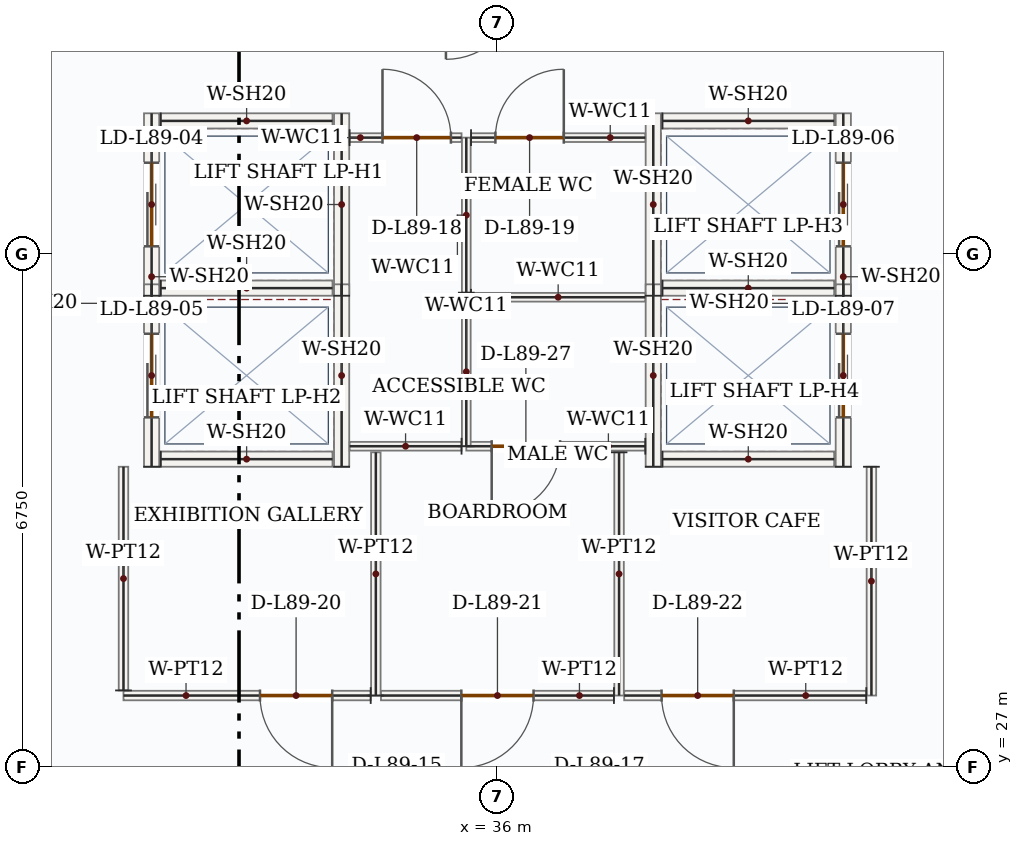
"""IFC4 building model, lengths in metres.
Left out: names, types, materials, properties, quantities, classifications, styles, units other than length and angle.
Written with IfcOpenShell. Run it as: python <this file> out.ifc"""

import sys

from ifc_helpers import new_model, si_unit, direction, frame, frame_2d, origin, place, context, subcontext, project, spatial, rectangle, extrude, source, transform, mapped, element, fill, save


model = new_model("IFC4")
c1 = context("Model", 3, precision=1e-05, world=origin(), true_north=direction((0.0, 1.0)))
c2 = subcontext(c1, "Body", "Model", "MODEL_VIEW")
j1 = project(units=[si_unit("LENGTHUNIT", "METRE"), si_unit("PLANEANGLEUNIT", "RADIAN")], contexts=[c1])
p1 = place(None, origin())
s1 = spatial("IfcSite", under=j1, at=p1, CompositionType="ELEMENT")
p2 = place(p1, origin())
s2 = spatial("IfcBuilding", under=s1, at=p2, CompositionType="ELEMENT")
p3 = place(p2, frame((0.0, 0.0, 365.85)))
s3 = spatial("IfcBuildingStorey", under=s2, at=p3, CompositionType="ELEMENT", Elevation=365.85)
p4 = place(p3, frame((31.45, 33.2, 0.0), z_axis=(0.0, 0.0, 1.0), x_axis=(0.0, 1.0, 0.0)))
e1 = element("IfcWall", 1, at=p4, inside=s3, PredefinedType="SOLIDWALL", context=c2, shape_type="SweptSolid", body=[
    extrude(rectangle(XDim=2.4, YDim=0.2, at=frame_2d((1.2, 0.0))), origin(), (0.0, 0.0, 1.0), 4.55),
])
p5 = place(p4, frame((0.65, 0.0, 0.0)))
e2 = element("IfcOpeningElement", 2, at=p5, cuts=e1, PredefinedType="OPENING", context=c2, shape_type="SweptSolid", body=[
    extrude(rectangle(XDim=1.1, YDim=2.15, at=frame_2d((0.55, 1.075))), frame((0.0, 0.11, 0.0), z_axis=(0.0, -1.0, 0.0), x_axis=(1.0, 0.0, 0.0)), (0.0, 0.0, 1.0), 0.22),
])
m1 = source(origin(), c2, "Body", "SweptSolid", [
    extrude(rectangle(XDim=2.4, YDim=0.2, at=frame_2d((1.2, 0.0))), origin(), (0.0, 0.0, 1.0), 4.55),
])
p6 = place(p3, frame((33.95, 33.2, 0.0), z_axis=(0.0, 0.0, 1.0), x_axis=(0.0, 1.0, 0.0)))
e3 = element("IfcWall", 3, at=p6, inside=s3, PredefinedType="SOLIDWALL", context=c2, shape_type="MappedRepresentation", body=[
    mapped(m1, transform((0.0, 0.0, 0.0), x_axis=(1.0, 0.0, 0.0), y_axis=(0.0, 1.0, 0.0), z_axis=(0.0, 0.0, 1.0), scale=1.0)),
])
m2 = source(origin(), c2, "Body", "SweptSolid", [
    extrude(rectangle(XDim=2.26, YDim=0.2, at=frame_2d((1.13, 0.0))), origin(), (0.0, 0.0, 1.0), 4.55),
])
for number, where, z_axis, x_axis in (
    (4, (31.57, 33.3, 0.0), (0.0, 0.0, 1.0), (1.0, 0.0, 0.0)),
    (5, (31.57, 35.5, 0.0), (0.0, 0.0, 1.0), (1.0, 0.0, 0.0)),
):
    element("IfcWall", number, at=place(p3, frame(where, z_axis=z_axis, x_axis=x_axis)), inside=s3, PredefinedType="SOLIDWALL", context=c2, shape_type="MappedRepresentation", body=[
        mapped(m2, transform((0.0, 0.0, 0.0), x_axis=(1.0, 0.0, 0.0), y_axis=(0.0, 1.0, 0.0), z_axis=(0.0, 0.0, 1.0), scale=1.0)),
    ])
p7 = place(p3, frame((31.45, 30.95, 0.0), z_axis=(0.0, 0.0, 1.0), x_axis=(0.0, 1.0, 0.0)))
e6 = element("IfcWall", 6, at=p7, inside=s3, PredefinedType="SOLIDWALL", context=c2, shape_type="SweptSolid", body=[
    extrude(rectangle(XDim=2.4, YDim=0.2, at=frame_2d((1.2, 0.0))), origin(), (0.0, 0.0, 1.0), 4.55),
])
p8 = place(p7, frame((0.65, 0.0, 0.0)))
e7 = element("IfcOpeningElement", 7, at=p8, cuts=e6, PredefinedType="OPENING", context=c2, shape_type="SweptSolid", body=[
    extrude(rectangle(XDim=1.1, YDim=2.15, at=frame_2d((0.55, 1.075))), frame((0.0, 0.11, 0.0), z_axis=(0.0, -1.0, 0.0), x_axis=(1.0, 0.0, 0.0)), (0.0, 0.0, 1.0), 0.22),
])
p9 = place(p3, frame((33.95, 30.95, 0.0), z_axis=(0.0, 0.0, 1.0), x_axis=(0.0, 1.0, 0.0)))
e8 = element("IfcWall", 8, at=p9, inside=s3, PredefinedType="SOLIDWALL", context=c2, shape_type="MappedRepresentation", body=[
    mapped(m1, transform((0.0, 0.0, 0.0), x_axis=(1.0, 0.0, 0.0), y_axis=(0.0, 1.0, 0.0), z_axis=(0.0, 0.0, 1.0), scale=1.0)),
])
p10 = place(p3, frame((31.57, 31.05, 0.0), z_axis=(0.0, 0.0, 1.0), x_axis=(1.0, 0.0, 0.0)))
e9 = element("IfcWall", 9, at=p10, inside=s3, PredefinedType="SOLIDWALL", context=c2, shape_type="MappedRepresentation", body=[
    mapped(m2, transform((0.0, 0.0, 0.0), x_axis=(1.0, 0.0, 0.0), y_axis=(0.0, 1.0, 0.0), z_axis=(0.0, 0.0, 1.0), scale=1.0)),
])
p11 = place(p3, frame((38.05, 33.2, 0.0), z_axis=(0.0, 0.0, 1.0), x_axis=(0.0, 1.0, 0.0)))
e10 = element("IfcWall", 10, at=p11, inside=s3, PredefinedType="SOLIDWALL", context=c2, shape_type="MappedRepresentation", body=[
    mapped(m1, transform((0.0, 0.0, 0.0), x_axis=(1.0, 0.0, 0.0), y_axis=(0.0, 1.0, 0.0), z_axis=(0.0, 0.0, 1.0), scale=1.0)),
])
p12 = place(p3, frame((40.55, 33.2, 0.0), z_axis=(0.0, 0.0, 1.0), x_axis=(0.0, 1.0, 0.0)))
e11 = element("IfcWall", 11, at=p12, inside=s3, PredefinedType="SOLIDWALL", context=c2, shape_type="SweptSolid", body=[
    extrude(rectangle(XDim=2.4, YDim=0.2, at=frame_2d((1.2, 0.0))), origin(), (0.0, 0.0, 1.0), 4.55),
])
p13 = place(p12, frame((0.65, 0.0, 0.0)))
e12 = element("IfcOpeningElement", 12, at=p13, cuts=e11, PredefinedType="OPENING", context=c2, shape_type="SweptSolid", body=[
    extrude(rectangle(XDim=1.1, YDim=2.15, at=frame_2d((0.55, 1.075))), frame((0.0, 0.11, 0.0), z_axis=(0.0, -1.0, 0.0), x_axis=(1.0, 0.0, 0.0)), (0.0, 0.0, 1.0), 0.22),
])
for number, where, z_axis, x_axis in (
    (13, (38.17, 33.3, 0.0), (0.0, 0.0, 1.0), (1.0, 0.0, 0.0)),
    (14, (38.17, 35.5, 0.0), (0.0, 0.0, 1.0), (1.0, 0.0, 0.0)),
):
    element("IfcWall", number, at=place(p3, frame(where, z_axis=z_axis, x_axis=x_axis)), inside=s3, PredefinedType="SOLIDWALL", context=c2, shape_type="MappedRepresentation", body=[
        mapped(m2, transform((0.0, 0.0, 0.0), x_axis=(1.0, 0.0, 0.0), y_axis=(0.0, 1.0, 0.0), z_axis=(0.0, 0.0, 1.0), scale=1.0)),
    ])
p14 = place(p3, frame((38.05, 30.95, 0.0), z_axis=(0.0, 0.0, 1.0), x_axis=(0.0, 1.0, 0.0)))
e15 = element("IfcWall", 15, at=p14, inside=s3, PredefinedType="SOLIDWALL", context=c2, shape_type="MappedRepresentation", body=[
    mapped(m1, transform((0.0, 0.0, 0.0), x_axis=(1.0, 0.0, 0.0), y_axis=(0.0, 1.0, 0.0), z_axis=(0.0, 0.0, 1.0), scale=1.0)),
])
p15 = place(p3, frame((40.55, 30.95, 0.0), z_axis=(0.0, 0.0, 1.0), x_axis=(0.0, 1.0, 0.0)))
e16 = element("IfcWall", 16, at=p15, inside=s3, PredefinedType="SOLIDWALL", context=c2, shape_type="SweptSolid", body=[
    extrude(rectangle(XDim=2.4, YDim=0.2, at=frame_2d((1.2, 0.0))), origin(), (0.0, 0.0, 1.0), 4.55),
])
p16 = place(p15, frame((0.65, 0.0, 0.0)))
e17 = element("IfcOpeningElement", 17, at=p16, cuts=e16, PredefinedType="OPENING", context=c2, shape_type="SweptSolid", body=[
    extrude(rectangle(XDim=1.1, YDim=2.15, at=frame_2d((0.55, 1.075))), frame((0.0, 0.11, 0.0), z_axis=(0.0, -1.0, 0.0), x_axis=(1.0, 0.0, 0.0)), (0.0, 0.0, 1.0), 0.22),
])
p17 = place(p3, frame((38.17, 31.05, 0.0), z_axis=(0.0, 0.0, 1.0), x_axis=(1.0, 0.0, 0.0)))
e18 = element("IfcWall", 18, at=p17, inside=s3, PredefinedType="SOLIDWALL", context=c2, shape_type="MappedRepresentation", body=[
    mapped(m2, transform((0.0, 0.0, 0.0), x_axis=(1.0, 0.0, 0.0), y_axis=(0.0, 1.0, 0.0), z_axis=(0.0, 0.0, 1.0), scale=1.0)),
])
p18 = place(p3, frame((37.945, 31.22, 0.0), z_axis=(0.0, 0.0, 1.0), x_axis=(-1.0, 0.0, 0.0)))
e19 = element("IfcWall", 19, at=p18, inside=s3, PredefinedType="PARTITIONING", context=c2, shape_type="SweptSolid", body=[
    extrude(rectangle(XDim=2.355, YDim=0.115, at=frame_2d((1.177, 0.0))), origin(), (0.0, 0.0, 1.0), 4.55),
])
p19 = place(p18, frame((1.121, 0.0, 0.0)))
e20 = element("IfcOpeningElement", 20, at=p19, cuts=e19, PredefinedType="OPENING", context=c2, shape_type="SweptSolid", body=[
    extrude(rectangle(XDim=0.9, YDim=2.1, at=frame_2d((0.45, 1.05))), frame((0.0, 0.067, 0.0), z_axis=(0.0, -1.0, 0.0), x_axis=(1.0, 0.0, 0.0)), (0.0, 0.0, 1.0), 0.135),
])
m3 = source(origin(), c2, "Body", "SweptSolid", [
    extrude(rectangle(XDim=1.96, YDim=0.115, at=frame_2d((0.98, 0.0))), origin(), (0.0, 0.0, 1.0), 4.55),
])
p20 = place(p3, frame((35.59, 31.22, 0.0), z_axis=(0.0, 0.0, 1.0), x_axis=(0.0, 1.0, 0.0)))
e21 = element("IfcWall", 21, at=p20, inside=s3, PredefinedType="PARTITIONING", context=c2, shape_type="MappedRepresentation", body=[
    mapped(m3, transform((0.0, 0.0, 0.0), x_axis=(1.0, 0.0, 0.0), y_axis=(0.0, 1.0, 0.0), z_axis=(0.0, 0.0, 1.0), scale=1.0)),
])
m4 = source(origin(), c2, "Body", "SweptSolid", [
    extrude(rectangle(XDim=2.292, YDim=0.115, at=frame_2d((1.146, 0.0))), origin(), (0.0, 0.0, 1.0), 4.55),
])
p21 = place(p3, frame((35.653, 33.18, 0.0), z_axis=(0.0, 0.0, 1.0), x_axis=(1.0, 0.0, 0.0)))
e22 = element("IfcWall", 22, at=p21, inside=s3, PredefinedType="PARTITIONING", context=c2, shape_type="MappedRepresentation", body=[
    mapped(m4, transform((0.0, 0.0, 0.0), x_axis=(1.0, 0.0, 0.0), y_axis=(0.0, 1.0, 0.0), z_axis=(0.0, 0.0, 1.0), scale=1.0)),
])
m5 = source(origin(), c2, "Body", "SweptSolid", [
    extrude(rectangle(XDim=2.04, YDim=0.115, at=frame_2d((1.02, 0.0))), origin(), (0.0, 0.0, 1.0), 4.55),
])
p22 = place(p3, frame((35.59, 33.24, 0.0), z_axis=(0.0, 0.0, 1.0), x_axis=(0.0, 1.0, 0.0)))
e23 = element("IfcWall", 23, at=p22, inside=s3, PredefinedType="PARTITIONING", context=c2, shape_type="MappedRepresentation", body=[
    mapped(m5, transform((0.0, 0.0, 0.0), x_axis=(1.0, 0.0, 0.0), y_axis=(0.0, 1.0, 0.0), z_axis=(0.0, 0.0, 1.0), scale=1.0)),
])
p23 = place(p3, frame((35.653, 35.28, 0.0), z_axis=(0.0, 0.0, 1.0), x_axis=(1.0, 0.0, 0.0)))
e24 = element("IfcWall", 24, at=p23, inside=s3, PredefinedType="PARTITIONING", context=c2, shape_type="SweptSolid", body=[
    extrude(rectangle(XDim=2.292, YDim=0.115, at=frame_2d((1.146, 0.0))), origin(), (0.0, 0.0, 1.0), 4.55),
])
p24 = place(p23, frame((0.32, 0.0, 0.0)))
e25 = element("IfcOpeningElement", 25, at=p24, cuts=e24, PredefinedType="OPENING", context=c2, shape_type="SweptSolid", body=[
    extrude(rectangle(XDim=0.9, YDim=2.1, at=frame_2d((0.45, 1.05))), frame((0.0, 0.067, 0.0), z_axis=(0.0, -1.0, 0.0), x_axis=(1.0, 0.0, 0.0)), (0.0, 0.0, 1.0), 0.135),
])
m6 = source(origin(), c2, "Body", "SweptSolid", [
    extrude(rectangle(XDim=1.473, YDim=0.115, at=frame_2d((0.736, 0.0))), origin(), (0.0, 0.0, 1.0), 4.55),
])
p25 = place(p3, frame((35.528, 31.22, 0.0), z_axis=(0.0, 0.0, 1.0), x_axis=(-1.0, 0.0, 0.0)))
e26 = element("IfcWall", 26, at=p25, inside=s3, PredefinedType="PARTITIONING", context=c2, shape_type="MappedRepresentation", body=[
    mapped(m6, transform((0.0, 0.0, 0.0), x_axis=(1.0, 0.0, 0.0), y_axis=(0.0, 1.0, 0.0), z_axis=(0.0, 0.0, 1.0), scale=1.0)),
])
p26 = place(p3, frame((34.055, 35.28, 0.0), z_axis=(0.0, 0.0, 1.0), x_axis=(1.0, 0.0, 0.0)))
e27 = element("IfcWall", 27, at=p26, inside=s3, PredefinedType="PARTITIONING", context=c2, shape_type="SweptSolid", body=[
    extrude(rectangle(XDim=1.473, YDim=0.115, at=frame_2d((0.736, 0.0))), origin(), (0.0, 0.0, 1.0), 4.55),
])
p27 = place(p26, frame((0.433, 0.0, 0.0)))
e28 = element("IfcOpeningElement", 28, at=p27, cuts=e27, PredefinedType="OPENING", context=c2, shape_type="SweptSolid", body=[
    extrude(rectangle(XDim=0.9, YDim=2.1, at=frame_2d((0.45, 1.05))), frame((0.0, 0.067, 0.0), z_axis=(0.0, -1.0, 0.0), x_axis=(1.0, 0.0, 0.0)), (0.0, 0.0, 1.0), 0.135),
])
m7 = source(origin(), c2, "Body", "SweptSolid", [
    extrude(rectangle(XDim=3.2, YDim=0.125, at=frame_2d((1.6, 0.0))), origin(), (0.0, 0.0, 1.0), 4.55),
])
for number, where, z_axis, x_axis in (
    (29, (34.4, 27.94, 0.0), (0.0, 0.0, 1.0), (0.0, 1.0, 0.0)),
    (30, (37.6, 31.14, 0.0), (0.0, 0.0, 1.0), (0.0, -1.0, 0.0)),
):
    element("IfcWall", number, at=place(p3, frame(where, z_axis=z_axis, x_axis=x_axis)), inside=s3, PredefinedType="PARTITIONING", context=c2, shape_type="MappedRepresentation", body=[
        mapped(m7, transform((0.0, 0.0, 0.0), x_axis=(1.0, 0.0, 0.0), y_axis=(0.0, 1.0, 0.0), z_axis=(0.0, 0.0, 1.0), scale=1.0)),
    ])
p28 = place(p3, frame((37.532, 27.94, 0.0), z_axis=(0.0, 0.0, 1.0), x_axis=(-1.0, 0.0, 0.0)))
e31 = element("IfcWall", 31, at=p28, inside=s3, PredefinedType="PARTITIONING", context=c2, shape_type="SweptSolid", body=[
    extrude(rectangle(XDim=3.065, YDim=0.125, at=frame_2d((1.532, 0.0))), origin(), (0.0, 0.0, 1.0), 4.55),
])
p29 = place(p28, frame((1.058, 0.0, 0.0)))
e32 = element("IfcOpeningElement", 32, at=p29, cuts=e31, PredefinedType="OPENING", context=c2, shape_type="SweptSolid", body=[
    extrude(rectangle(XDim=0.95, YDim=2.15, at=frame_2d((0.475, 1.075))), frame((0.0, 0.073, 0.0), z_axis=(0.0, -1.0, 0.0), x_axis=(1.0, 0.0, 0.0)), (0.0, 0.0, 1.0), 0.145),
])
p30 = place(p3, frame((34.333, 27.94, 0.0), z_axis=(0.0, 0.0, 1.0), x_axis=(-1.0, 0.0, 0.0)))
e33 = element("IfcWall", 33, at=p30, inside=s3, PredefinedType="PARTITIONING", context=c2, shape_type="SweptSolid", body=[
    extrude(rectangle(XDim=3.252, YDim=0.125, at=frame_2d((1.626, 0.0))), origin(), (0.0, 0.0, 1.0), 4.55),
])
p31 = place(p30, frame((0.507, 0.0, 0.0)))
e34 = element("IfcOpeningElement", 34, at=p31, cuts=e33, PredefinedType="OPENING", context=c2, shape_type="SweptSolid", body=[
    extrude(rectangle(XDim=0.95, YDim=2.15, at=frame_2d((0.475, 1.075))), frame((0.0, 0.073, 0.0), z_axis=(0.0, -1.0, 0.0), x_axis=(1.0, 0.0, 0.0)), (0.0, 0.0, 1.0), 0.145),
])
m8 = source(origin(), c2, "Body", "SweptSolid", [
    extrude(rectangle(XDim=2.942, YDim=0.125, at=frame_2d((1.471, 0.0))), origin(), (0.0, 0.0, 1.0), 4.55),
])
p32 = place(p3, frame((31.08, 28.008, 0.0), z_axis=(0.0, 0.0, 1.0), x_axis=(0.0, 1.0, 0.0)))
e35 = element("IfcWall", 35, at=p32, inside=s3, PredefinedType="PARTITIONING", context=c2, shape_type="MappedRepresentation", body=[
    mapped(m8, transform((0.0, 0.0, 0.0), x_axis=(1.0, 0.0, 0.0), y_axis=(0.0, 1.0, 0.0), z_axis=(0.0, 0.0, 1.0), scale=1.0)),
])
m9 = source(origin(), c2, "Body", "SweptSolid", [
    extrude(rectangle(XDim=3.01, YDim=0.125, at=frame_2d((1.505, 0.0))), origin(), (0.0, 0.0, 1.0), 4.55),
])
p33 = place(p3, frame((40.92, 30.95, 0.0), z_axis=(0.0, 0.0, 1.0), x_axis=(0.0, -1.0, 0.0)))
e36 = element("IfcWall", 36, at=p33, inside=s3, PredefinedType="PARTITIONING", context=c2, shape_type="MappedRepresentation", body=[
    mapped(m9, transform((0.0, 0.0, 0.0), x_axis=(1.0, 0.0, 0.0), y_axis=(0.0, 1.0, 0.0), z_axis=(0.0, 0.0, 1.0), scale=1.0)),
])
p34 = place(p3, frame((40.853, 27.94, 0.0), z_axis=(0.0, 0.0, 1.0), x_axis=(-1.0, 0.0, 0.0)))
e37 = element("IfcWall", 37, at=p34, inside=s3, PredefinedType="PARTITIONING", context=c2, shape_type="SweptSolid", body=[
    extrude(rectangle(XDim=3.185, YDim=0.125, at=frame_2d((1.593, 0.0))), origin(), (0.0, 0.0, 1.0), 4.55),
])
p35 = place(p34, frame((1.743, 0.0, 0.0)))
e38 = element("IfcOpeningElement", 38, at=p35, cuts=e37, PredefinedType="OPENING", context=c2, shape_type="SweptSolid", body=[
    extrude(rectangle(XDim=0.95, YDim=2.15, at=frame_2d((0.475, 1.075))), frame((0.0, 0.073, 0.0), z_axis=(0.0, -1.0, 0.0), x_axis=(1.0, 0.0, 0.0)), (0.0, 0.0, 1.0), 0.145),
])
m10 = source(origin(), c2, "Body", "SweptSolid", [
    extrude(rectangle(XDim=1.1, YDim=2.15, at=frame_2d((0.55, 1.075))), frame((0.0, 0.025, 0.0), z_axis=(0.0, -1.0, 0.0), x_axis=(1.0, 0.0, 0.0)), (0.0, 0.0, 1.0), 0.05),
])
p36 = place(p5, origin())
e39 = element("IfcDoor", 39, at=p36, inside=s3, OperationType="DOUBLE_DOOR_SLIDING", PredefinedType="DOOR", context=c2, shape_type="MappedRepresentation", body=[
    mapped(m10, transform((0.0, 0.0, 0.0), x_axis=(1.0, 0.0, 0.0), y_axis=(0.0, 1.0, 0.0), z_axis=(0.0, 0.0, 1.0), scale=1.0)),
])
fill(e2, e39)
p37 = place(p8, origin())
e40 = element("IfcDoor", 40, at=p37, inside=s3, OperationType="DOUBLE_DOOR_SLIDING", PredefinedType="DOOR", context=c2, shape_type="MappedRepresentation", body=[
    mapped(m10, transform((0.0, 0.0, 0.0), x_axis=(1.0, 0.0, 0.0), y_axis=(0.0, 1.0, 0.0), z_axis=(0.0, 0.0, 1.0), scale=1.0)),
])
fill(e7, e40)
p38 = place(p13, origin())
e41 = element("IfcDoor", 41, at=p38, inside=s3, OperationType="DOUBLE_DOOR_SLIDING", PredefinedType="DOOR", context=c2, shape_type="MappedRepresentation", body=[
    mapped(m10, transform((0.0, 0.0, 0.0), x_axis=(1.0, 0.0, 0.0), y_axis=(0.0, 1.0, 0.0), z_axis=(0.0, 0.0, 1.0), scale=1.0)),
])
fill(e12, e41)
p39 = place(p16, origin())
e42 = element("IfcDoor", 42, at=p39, inside=s3, OperationType="DOUBLE_DOOR_SLIDING", PredefinedType="DOOR", context=c2, shape_type="MappedRepresentation", body=[
    mapped(m10, transform((0.0, 0.0, 0.0), x_axis=(1.0, 0.0, 0.0), y_axis=(0.0, 1.0, 0.0), z_axis=(0.0, 0.0, 1.0), scale=1.0)),
])
fill(e17, e42)
m11 = source(origin(), c2, "Body", "SweptSolid", [
    extrude(rectangle(XDim=0.9, YDim=2.1, at=frame_2d((0.45, 1.05))), frame((0.0, 0.025, 0.0), z_axis=(0.0, -1.0, 0.0), x_axis=(1.0, 0.0, 0.0)), (0.0, 0.0, 1.0), 0.05),
])
p40 = place(p27, origin())
e43 = element("IfcDoor", 43, at=p40, inside=s3, OperationType="SINGLE_SWING_LEFT", PredefinedType="DOOR", context=c2, shape_type="MappedRepresentation", body=[
    mapped(m11, transform((0.0, 0.0, 0.0), x_axis=(1.0, 0.0, 0.0), y_axis=(0.0, 1.0, 0.0), z_axis=(0.0, 0.0, 1.0), scale=1.0)),
])
fill(e28, e43)
p41 = place(p24, origin())
e44 = element("IfcDoor", 44, at=p41, inside=s3, OperationType="SINGLE_SWING_RIGHT", PredefinedType="DOOR", context=c2, shape_type="MappedRepresentation", body=[
    mapped(m11, transform((0.0, 0.0, 0.0), x_axis=(1.0, 0.0, 0.0), y_axis=(0.0, 1.0, 0.0), z_axis=(0.0, 0.0, 1.0), scale=1.0)),
])
fill(e25, e44)
m12 = source(origin(), c2, "Body", "SweptSolid", [
    extrude(rectangle(XDim=0.95, YDim=2.15, at=frame_2d((0.475, 1.075))), frame((0.0, 0.025, 0.0), z_axis=(0.0, -1.0, 0.0), x_axis=(1.0, 0.0, 0.0)), (0.0, 0.0, 1.0), 0.05),
])
p42 = place(p31, origin())
e45 = element("IfcDoor", 45, at=p42, inside=s3, OperationType="SINGLE_SWING_LEFT", PredefinedType="DOOR", context=c2, shape_type="MappedRepresentation", body=[
    mapped(m12, transform((0.0, 0.0, 0.0), x_axis=(1.0, 0.0, 0.0), y_axis=(0.0, 1.0, 0.0), z_axis=(0.0, 0.0, 1.0), scale=1.0)),
])
fill(e34, e45)
p43 = place(p29, origin())
e46 = element("IfcDoor", 46, at=p43, inside=s3, OperationType="SINGLE_SWING_RIGHT", PredefinedType="DOOR", context=c2, shape_type="MappedRepresentation", body=[
    mapped(m12, transform((0.0, 0.0, 0.0), x_axis=(1.0, 0.0, 0.0), y_axis=(0.0, 1.0, 0.0), z_axis=(0.0, 0.0, 1.0), scale=1.0)),
])
fill(e32, e46)
p44 = place(p35, origin())
e47 = element("IfcDoor", 47, at=p44, inside=s3, OperationType="SINGLE_SWING_LEFT", PredefinedType="DOOR", context=c2, shape_type="MappedRepresentation", body=[
    mapped(m12, transform((0.0, 0.0, 0.0), x_axis=(1.0, 0.0, 0.0), y_axis=(0.0, 1.0, 0.0), z_axis=(0.0, 0.0, 1.0), scale=1.0)),
])
fill(e38, e47)
p45 = place(p19, origin())
e48 = element("IfcDoor", 48, at=p45, inside=s3, OperationType="SINGLE_SWING_RIGHT", PredefinedType="DOOR", context=c2, shape_type="MappedRepresentation", body=[
    mapped(m11, transform((0.0, 0.0, 0.0), x_axis=(1.0, 0.0, 0.0), y_axis=(0.0, 1.0, 0.0), z_axis=(0.0, 0.0, 1.0), scale=1.0)),
])
fill(e20, e48)
save(model, sys.argv[1])
